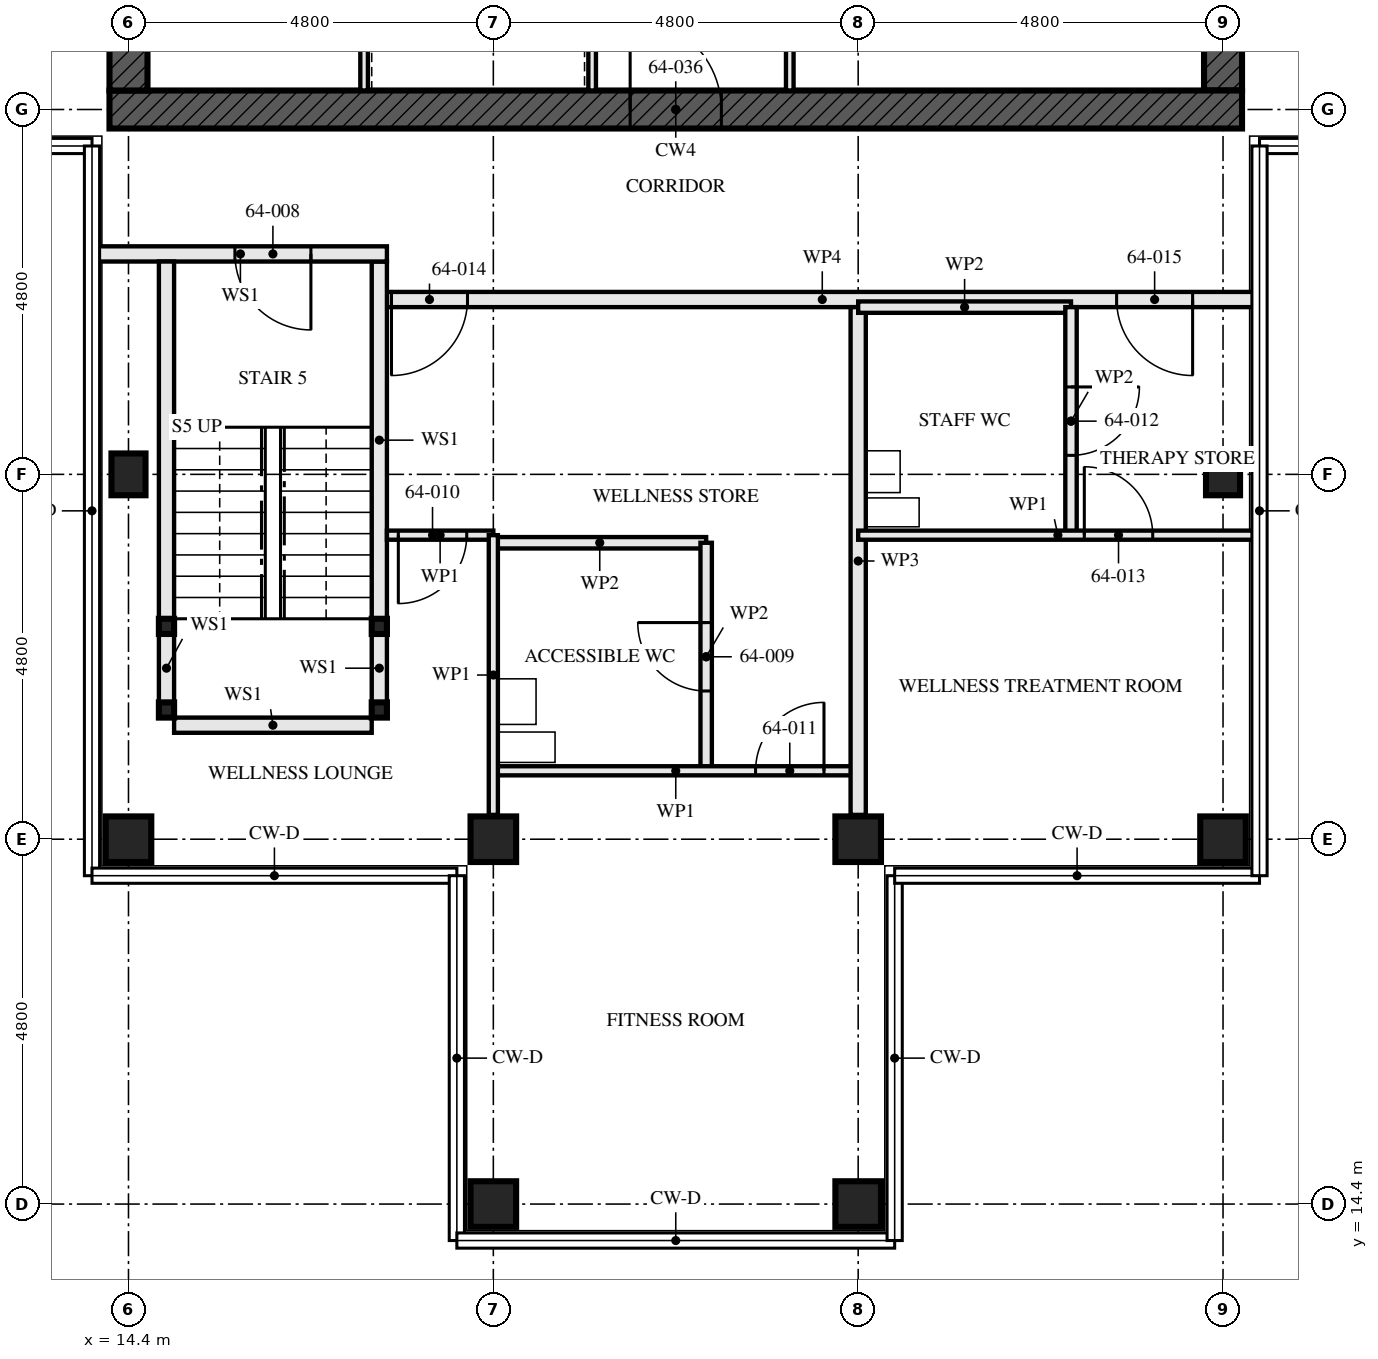
"""IFC4 building model, lengths in metres.
Left out: names, types, materials, properties, quantities, classifications, styles, units other than length and angle.
Written with IfcOpenShell. Run it as: python <this file> out.ifc"""

import sys

from ifc_helpers import new_model, si_unit, direction, frame, frame_2d, origin, origin_2d, place, context, subcontext, project, spatial, rectangle, hollow_rectangle, i_section, extrude, element, fill, save


model = new_model("IFC4")
c1 = context("Model", 3, precision=1e-05, world=origin(), true_north=direction((0.0, 1.0)))
c2 = subcontext(c1, "Body", "Model", "MODEL_VIEW")
j1 = project(units=[si_unit("LENGTHUNIT", "METRE"), si_unit("PLANEANGLEUNIT", "RADIAN")], contexts=[c1])
p1 = place(None, origin())
s1 = spatial("IfcSite", under=j1, at=p1, CompositionType="ELEMENT")
p2 = place(p1, origin())
s2 = spatial("IfcBuilding", under=s1, at=p2, CompositionType="ELEMENT")
p3 = place(p2, frame((0.0, 0.0, 233.0)))
s3 = spatial("IfcBuildingStorey", under=s2, at=p3, CompositionType="ELEMENT", Elevation=233.0)
p4 = place(p3, frame((14.4, 19.2, 0.0), z_axis=(0.0, 0.0, 1.0), x_axis=(0.0, 1.0, 0.0)))
e1 = element("IfcColumn", 1, at=p4, inside=s3, PredefinedType="COLUMN", context=c2, shape_type="SweptSolid", body=[
    extrude(hollow_rectangle(XDim=0.6, YDim=0.6, WallThickness=0.05, at=origin_2d()), origin(), (0.0, 0.0, 1.0), 3.5),
])
p5 = place(p3, frame((14.4, 24.0, 0.0), z_axis=(0.0, 0.0, 1.0), x_axis=(1.0, 0.0, 0.0)))
e2 = element("IfcColumn", 2, at=p5, inside=s3, PredefinedType="COLUMN", context=c2, shape_type="SweptSolid", body=[
    extrude(i_section(OverallWidth=0.448, OverallDepth=0.55, WebThickness=0.072, FlangeThickness=0.115, FilletRadius=0.015, at=origin_2d()), origin(), (0.0, 0.0, 1.0), 3.5),
])
for number, where, z_axis, x_axis in (
    (3, (19.2, 14.4, 0.0), (0.0, 0.0, 1.0), (0.0, 1.0, 0.0)),
    (4, (19.2, 19.2, 0.0), (0.0, 0.0, 1.0), (0.0, 1.0, 0.0)),
    (5, (24.0, 14.4, 0.0), (0.0, 0.0, 1.0), (0.0, 1.0, 0.0)),
    (6, (24.0, 19.2, 0.0), (0.0, 0.0, 1.0), (0.0, 1.0, 0.0)),
    (7, (28.8, 19.2, 0.0), (0.0, 0.0, 1.0), (0.0, 1.0, 0.0)),
):
    element("IfcColumn", number, at=place(p3, frame(where, z_axis=z_axis, x_axis=x_axis)), inside=s3, PredefinedType="COLUMN", context=c2, shape_type="SweptSolid", body=[
        extrude(hollow_rectangle(XDim=0.6, YDim=0.6, WallThickness=0.05, at=origin_2d()), origin(), (0.0, 0.0, 1.0), 3.5),
    ])
p6 = place(p3, frame((28.8, 24.0, 0.0), z_axis=(0.0, 0.0, 1.0), x_axis=(1.0, 0.0, 0.0)))
e8 = element("IfcColumn", 8, at=p6, inside=s3, PredefinedType="COLUMN", context=c2, shape_type="SweptSolid", body=[
    extrude(i_section(OverallWidth=0.448, OverallDepth=0.55, WebThickness=0.072, FlangeThickness=0.115, FilletRadius=0.015, at=origin_2d()), origin(), (0.0, 0.0, 1.0), 3.5),
])
p7 = place(p3, frame((14.15, 28.8, -0.17), z_axis=(0.0, 0.0, 1.0), x_axis=(1.0, 0.0, 0.0)))
e9 = element("IfcWall", 9, at=p7, inside=s3, PredefinedType="SHEAR", context=c2, shape_type="SweptSolid", body=[
    extrude(rectangle(XDim=14.9, YDim=0.5, at=frame_2d((7.45, 0.0))), origin(), (0.0, 0.0, 1.0), 3.5),
])
p8 = place(p7, frame((6.85, 0.0, 0.17)))
e10 = element("IfcOpeningElement", 10, at=p8, cuts=e9, PredefinedType="OPENING", context=c2, shape_type="SweptSolid", body=[
    extrude(rectangle(XDim=1.2, YDim=2.1, at=frame_2d((0.6, 1.05))), frame((0.0, 0.26, 0.0), z_axis=(0.0, -1.0, 0.0), x_axis=(1.0, 0.0, 0.0)), (0.0, 0.0, 1.0), 0.521),
])
p9 = place(p3, frame((14.4, 42.95, -0.17), z_axis=(0.0, 0.0, 1.0), x_axis=(0.0, -1.0, 0.0)))
e11 = element("IfcWall", 11, at=p9, inside=s3, PredefinedType="SHEAR", context=c2, shape_type="SweptSolid", body=[
    extrude(rectangle(XDim=13.9, YDim=0.5, at=frame_2d((6.95, 0.0))), origin(), (0.0, 0.0, 1.0), 3.5),
])
p10 = place(p9, frame((6.35, 0.0, 0.17)))
e12 = element("IfcOpeningElement", 12, at=p10, cuts=e11, PredefinedType="OPENING", context=c2, shape_type="SweptSolid", body=[
    extrude(rectangle(XDim=1.2, YDim=2.1, at=frame_2d((0.6, 1.05))), frame((0.0, 0.26, 0.0), z_axis=(0.0, -1.0, 0.0), x_axis=(1.0, 0.0, 0.0)), (0.0, 0.0, 1.0), 0.521),
])
p11 = place(p3, frame((28.8, 29.05, -0.17), z_axis=(0.0, 0.0, 1.0), x_axis=(0.0, 1.0, 0.0)))
e13 = element("IfcWall", 13, at=p11, inside=s3, PredefinedType="SHEAR", context=c2, shape_type="SweptSolid", body=[
    extrude(rectangle(XDim=13.9, YDim=0.5, at=frame_2d((6.95, 0.0))), origin(), (0.0, 0.0, 1.0), 3.5),
])
p12 = place(p11, frame((6.35, 0.0, 0.17)))
e14 = element("IfcOpeningElement", 14, at=p12, cuts=e13, PredefinedType="OPENING", context=c2, shape_type="SweptSolid", body=[
    extrude(rectangle(XDim=1.2, YDim=2.1, at=frame_2d((0.6, 1.05))), frame((0.0, 0.26, 0.0), z_axis=(0.0, -1.0, 0.0), x_axis=(1.0, 0.0, 0.0)), (0.0, 0.0, 1.0), 0.521),
])
for number, where, z_axis, x_axis in (
    (15, (14.9, 20.9, 0.0), (0.0, 0.0, 1.0), (1.0, 0.0, 0.0)),
    (16, (17.7, 20.9, 0.0), (0.0, 0.0, 1.0), (1.0, 0.0, 0.0)),
    (17, (14.9, 22.0, 0.0), (0.0, 0.0, 1.0), (1.0, 0.0, 0.0)),
    (18, (17.7, 22.0, 0.0), (0.0, 0.0, 1.0), (1.0, 0.0, 0.0)),
):
    element("IfcColumn", number, at=place(p3, frame(where, z_axis=z_axis, x_axis=x_axis)), inside=s3, PredefinedType="COLUMN", context=c2, shape_type="SweptSolid", body=[
        extrude(hollow_rectangle(XDim=0.2, YDim=0.2, WallThickness=0.008, at=origin_2d()), origin(), (0.0, 0.0, 1.0), 3.33),
    ])
p13 = place(p3, frame((14.9, 21.0, 0.0), z_axis=(0.0, 0.0, 1.0), x_axis=(0.0, 1.0, 0.0)))
e19 = element("IfcWall", 19, at=p13, inside=s3, PredefinedType="SOLIDWALL", context=c2, shape_type="SweptSolid", body=[
    extrude(rectangle(XDim=0.9, YDim=0.2, at=frame_2d((0.45, 0.0))), origin(), (0.0, 0.0, 1.0), 2.99),
])
p14 = place(p3, frame((14.9, 22.1, 0.0), z_axis=(0.0, 0.0, 1.0), x_axis=(0.0, 1.0, 0.0)))
e20 = element("IfcWall", 20, at=p14, inside=s3, PredefinedType="SOLIDWALL", context=c2, shape_type="SweptSolid", body=[
    extrude(rectangle(XDim=4.7, YDim=0.2, at=frame_2d((2.35, 0.0))), origin(), (0.0, 0.0, 1.0), 2.99),
])
p15 = place(p3, frame((17.7, 21.0, 0.0), z_axis=(0.0, 0.0, 1.0), x_axis=(0.0, 1.0, 0.0)))
e21 = element("IfcWall", 21, at=p15, inside=s3, PredefinedType="SOLIDWALL", context=c2, shape_type="SweptSolid", body=[
    extrude(rectangle(XDim=0.9, YDim=0.2, at=frame_2d((0.45, 0.0))), origin(), (0.0, 0.0, 1.0), 2.99),
])
p16 = place(p3, frame((17.7, 22.1, 0.0), z_axis=(0.0, 0.0, 1.0), x_axis=(0.0, 1.0, 0.0)))
e22 = element("IfcWall", 22, at=p16, inside=s3, PredefinedType="SOLIDWALL", context=c2, shape_type="SweptSolid", body=[
    extrude(rectangle(XDim=4.7, YDim=0.2, at=frame_2d((2.35, 0.0))), origin(), (0.0, 0.0, 1.0), 2.99),
])
p17 = place(p3, frame((15.0, 20.7, 0.0), z_axis=(0.0, 0.0, 1.0), x_axis=(1.0, 0.0, 0.0)))
e23 = element("IfcWall", 23, at=p17, inside=s3, PredefinedType="SOLIDWALL", context=c2, shape_type="SweptSolid", body=[
    extrude(rectangle(XDim=2.6, YDim=0.2, at=frame_2d((1.3, 0.0))), origin(), (0.0, 0.0, 1.0), 3.33),
])
p18 = place(p3, frame((13.945, 26.9, 0.0), z_axis=(0.0, 0.0, 1.0), x_axis=(1.0, 0.0, 0.0)))
e24 = element("IfcWall", 24, at=p18, inside=s3, PredefinedType="SOLIDWALL", context=c2, shape_type="SweptSolid", body=[
    extrude(rectangle(XDim=3.855, YDim=0.2, at=frame_2d((1.927, 0.0))), origin(), (0.0, 0.0, 1.0), 2.32),
])
p19 = place(p18, frame((1.855, 0.0, 0.0)))
e25 = element("IfcOpeningElement", 25, at=p19, cuts=e24, PredefinedType="OPENING", context=c2, shape_type="SweptSolid", body=[
    extrude(rectangle(XDim=1.0, YDim=2.1, at=frame_2d((0.5, 1.05))), frame((0.0, 0.111, 0.0), z_axis=(0.0, -1.0, 0.0), x_axis=(1.0, 0.0, 0.0)), (0.0, 0.0, 1.0), 0.221),
])
p20 = place(p3, frame((22.0, 20.1, 0.0), z_axis=(0.0, 0.0, 1.0), x_axis=(0.0, 1.0, 0.0)))
e26 = element("IfcWall", 26, at=p20, inside=s3, PredefinedType="PARTITIONING", context=c2, shape_type="SweptSolid", body=[
    extrude(rectangle(XDim=3.0, YDim=0.15, at=frame_2d((1.5, 0.0))), origin(), (0.0, 0.0, 1.0), 3.33),
])
p21 = place(p20, frame((1.05, 0.0, 0.0)))
e27 = element("IfcOpeningElement", 27, at=p21, cuts=e26, PredefinedType="OPENING", context=c2, shape_type="SweptSolid", body=[
    extrude(rectangle(XDim=0.9, YDim=2.1, at=frame_2d((0.45, 1.05))), frame((0.0, 0.085, 0.0), z_axis=(0.0, -1.0, 0.0), x_axis=(1.0, 0.0, 0.0)), (0.0, 0.0, 1.0), 0.171),
])
p22 = place(p3, frame((19.2, 23.1, 0.0), z_axis=(0.0, 0.0, 1.0), x_axis=(1.0, 0.0, 0.0)))
e28 = element("IfcWall", 28, at=p22, inside=s3, PredefinedType="PARTITIONING", context=c2, shape_type="SweptSolid", body=[
    extrude(rectangle(XDim=2.8, YDim=0.15, at=frame_2d((1.4, 0.0))), origin(), (0.0, 0.0, 1.0), 3.33),
])
p23 = place(p3, frame((17.8, 23.2, 0.0), z_axis=(0.0, 0.0, 1.0), x_axis=(1.0, 0.0, 0.0)))
e29 = element("IfcWall", 29, at=p23, inside=s3, PredefinedType="PARTITIONING", context=c2, shape_type="SweptSolid", body=[
    extrude(rectangle(XDim=1.4, YDim=0.12, at=frame_2d((0.7, 0.0))), origin(), (0.0, 0.0, 1.0), 3.33),
])
p24 = place(p23, frame((0.15, 0.0, 0.0)))
e30 = element("IfcOpeningElement", 30, at=p24, cuts=e29, PredefinedType="OPENING", context=c2, shape_type="SweptSolid", body=[
    extrude(rectangle(XDim=0.9, YDim=2.1, at=frame_2d((0.45, 1.05))), frame((0.0, 0.071, 0.0), z_axis=(0.0, -1.0, 0.0), x_axis=(1.0, 0.0, 0.0)), (0.0, 0.0, 1.0), 0.141),
])
p25 = place(p3, frame((19.2, 20.1, 0.0), z_axis=(0.0, 0.0, 1.0), x_axis=(1.0, 0.0, 0.0)))
e31 = element("IfcWall", 31, at=p25, inside=s3, PredefinedType="PARTITIONING", context=c2, shape_type="SweptSolid", body=[
    extrude(rectangle(XDim=4.8, YDim=0.12, at=frame_2d((2.4, 0.0))), origin(), (0.0, 0.0, 1.0), 3.33),
])
p26 = place(p25, frame((3.45, 0.0, 0.0)))
e32 = element("IfcOpeningElement", 32, at=p26, cuts=e31, PredefinedType="OPENING", context=c2, shape_type="SweptSolid", body=[
    extrude(rectangle(XDim=0.9, YDim=2.1, at=frame_2d((0.45, 1.05))), frame((0.0, 0.071, 0.0), z_axis=(0.0, -1.0, 0.0), x_axis=(1.0, 0.0, 0.0)), (0.0, 0.0, 1.0), 0.141),
])
p27 = place(p3, frame((19.2, 19.52, 0.0), z_axis=(0.0, 0.0, 1.0), x_axis=(0.0, 1.0, 0.0)))
e33 = element("IfcWall", 33, at=p27, inside=s3, PredefinedType="PARTITIONING", context=c2, shape_type="SweptSolid", body=[
    extrude(rectangle(XDim=3.68, YDim=0.12, at=frame_2d((1.84, 0.0))), origin(), (0.0, 0.0, 1.0), 2.55),
])
p28 = place(p3, frame((24.0, 19.52, 0.0), z_axis=(0.0, 0.0, 1.0), x_axis=(0.0, 1.0, 0.0)))
e34 = element("IfcWall", 34, at=p28, inside=s3, PredefinedType="PARTITIONING", context=c2, shape_type="SweptSolid", body=[
    extrude(rectangle(XDim=6.68, YDim=0.2, at=frame_2d((3.34, 0.0))), origin(), (0.0, 0.0, 1.0), 2.55),
])
p29 = place(p3, frame((26.8, 23.2, 0.0), z_axis=(0.0, 0.0, 1.0), x_axis=(0.0, 1.0, 0.0)))
e35 = element("IfcWall", 35, at=p29, inside=s3, PredefinedType="PARTITIONING", context=c2, shape_type="SweptSolid", body=[
    extrude(rectangle(XDim=3.0, YDim=0.15, at=frame_2d((1.5, 0.0))), origin(), (0.0, 0.0, 1.0), 2.55),
])
p30 = place(p29, frame((1.05, 0.0, 0.0)))
e36 = element("IfcOpeningElement", 36, at=p30, cuts=e35, PredefinedType="OPENING", context=c2, shape_type="SweptSolid", body=[
    extrude(rectangle(XDim=0.9, YDim=2.1, at=frame_2d((0.45, 1.05))), frame((0.0, 0.085, 0.0), z_axis=(0.0, -1.0, 0.0), x_axis=(1.0, 0.0, 0.0)), (0.0, 0.0, 1.0), 0.171),
])
p31 = place(p3, frame((24.0, 26.2, 0.0), z_axis=(0.0, 0.0, 1.0), x_axis=(1.0, 0.0, 0.0)))
e37 = element("IfcWall", 37, at=p31, inside=s3, PredefinedType="PARTITIONING", context=c2, shape_type="SweptSolid", body=[
    extrude(rectangle(XDim=2.8, YDim=0.15, at=frame_2d((1.4, 0.0))), origin(), (0.0, 0.0, 1.0), 3.33),
])
p32 = place(p3, frame((24.0, 23.2, 0.0), z_axis=(0.0, 0.0, 1.0), x_axis=(1.0, 0.0, 0.0)))
e38 = element("IfcWall", 38, at=p32, inside=s3, PredefinedType="PARTITIONING", context=c2, shape_type="SweptSolid", body=[
    extrude(rectangle(XDim=5.255, YDim=0.12, at=frame_2d((2.627, 0.0))), origin(), (0.0, 0.0, 1.0), 2.32),
])
p33 = place(p32, frame((2.975, 0.0, 0.0)))
e39 = element("IfcOpeningElement", 39, at=p33, cuts=e38, PredefinedType="OPENING", context=c2, shape_type="SweptSolid", body=[
    extrude(rectangle(XDim=0.9, YDim=2.1, at=frame_2d((0.45, 1.05))), frame((0.0, 0.071, 0.0), z_axis=(0.0, -1.0, 0.0), x_axis=(1.0, 0.0, 0.0)), (0.0, 0.0, 1.0), 0.141),
])
p34 = place(p3, frame((17.8, 26.3, 0.0), z_axis=(0.0, 0.0, 1.0), x_axis=(1.0, 0.0, 0.0)))
e40 = element("IfcWall", 40, at=p34, inside=s3, PredefinedType="PARTITIONING", context=c2, shape_type="SweptSolid", body=[
    extrude(rectangle(XDim=11.455, YDim=0.2, at=frame_2d((5.728, 0.0))), origin(), (0.0, 0.0, 1.0), 2.32),
])
p35 = place(p34, frame((0.06, 0.0, 0.0)))
e41 = element("IfcOpeningElement", 41, at=p35, cuts=e40, PredefinedType="OPENING", context=c2, shape_type="SweptSolid", body=[
    extrude(rectangle(XDim=1.0, YDim=2.1, at=frame_2d((0.5, 1.05))), frame((0.0, 0.111, 0.0), z_axis=(0.0, -1.0, 0.0), x_axis=(1.0, 0.0, 0.0)), (0.0, 0.0, 1.0), 0.221),
])
p36 = place(p34, frame((9.6, 0.0, 0.0)))
e42 = element("IfcOpeningElement", 42, at=p36, cuts=e40, PredefinedType="OPENING", context=c2, shape_type="SweptSolid", body=[
    extrude(rectangle(XDim=1.0, YDim=2.1, at=frame_2d((0.5, 1.05))), frame((0.0, 0.111, 0.0), z_axis=(0.0, -1.0, 0.0), x_axis=(1.0, 0.0, 0.0)), (0.0, 0.0, 1.0), 0.221),
])
p37 = place(p3, frame((20.5, 29.05, 0.0), z_axis=(0.0, 0.0, 1.0), x_axis=(0.0, 1.0, 0.0)))
e43 = element("IfcWall", 43, at=p37, inside=s3, PredefinedType="SOLIDWALL", context=c2, shape_type="SweptSolid", body=[
    extrude(rectangle(XDim=5.8, YDim=0.1, at=frame_2d((2.9, 0.0))), origin(), (0.0, 0.0, 1.0), 3.33),
])
p38 = place(p37, frame((0.8, 0.0, 0.0)))
e44 = element("IfcOpeningElement", 44, at=p38, cuts=e43, PredefinedType="OPENING", context=c2, shape_type="SweptSolid", body=[
    extrude(rectangle(XDim=1.1, YDim=2.3, at=frame_2d((0.55, 1.15))), frame((0.0, 0.061, 0.0), z_axis=(0.0, -1.0, 0.0), x_axis=(1.0, 0.0, 0.0)), (0.0, 0.0, 1.0), 0.121),
])
p39 = place(p37, frame((3.775, 0.0, 0.0)))
e45 = element("IfcOpeningElement", 45, at=p39, cuts=e43, PredefinedType="OPENING", context=c2, shape_type="SweptSolid", body=[
    extrude(rectangle(XDim=1.1, YDim=2.3, at=frame_2d((0.55, 1.15))), frame((0.0, 0.061, 0.0), z_axis=(0.0, -1.0, 0.0), x_axis=(1.0, 0.0, 0.0)), (0.0, 0.0, 1.0), 0.121),
])
p40 = place(p3, frame((23.1, 29.05, 0.0), z_axis=(0.0, 0.0, 1.0), x_axis=(0.0, 1.0, 0.0)))
e46 = element("IfcWall", 46, at=p40, inside=s3, PredefinedType="SOLIDWALL", context=c2, shape_type="SweptSolid", body=[
    extrude(rectangle(XDim=5.8, YDim=0.1, at=frame_2d((2.9, 0.0))), origin(), (0.0, 0.0, 1.0), 3.33),
])
p41 = place(p40, frame((1.0, 0.0, 0.0)))
e47 = element("IfcOpeningElement", 47, at=p41, cuts=e46, PredefinedType="OPENING", context=c2, shape_type="SweptSolid", body=[
    extrude(rectangle(XDim=0.7, YDim=2.1, at=frame_2d((0.35, 1.05))), frame((0.0, 0.061, 0.0), z_axis=(0.0, -1.0, 0.0), x_axis=(1.0, 0.0, 0.0)), (0.0, 0.0, 1.0), 0.121),
])
p42 = place(p3, frame((17.5, 29.05, 0.0), z_axis=(0.0, 0.0, 1.0), x_axis=(0.0, 1.0, 0.0)))
e48 = element("IfcWall", 48, at=p42, inside=s3, PredefinedType="SOLIDWALL", context=c2, shape_type="SweptSolid", body=[
    extrude(rectangle(XDim=5.8, YDim=0.1, at=frame_2d((2.9, 0.0))), origin(), (0.0, 0.0, 1.0), 3.33),
])
p43 = place(p19, frame((1.0, 0.0, 0.0), z_axis=(0.0, 0.0, 1.0), x_axis=(-1.0, 0.0, 0.0)))
e49 = element("IfcDoor", 49, at=p43, inside=s3, OperationType="SINGLE_SWING_RIGHT", PredefinedType="DOOR", context=c2, shape_type="SweptSolid", body=[
    extrude(rectangle(XDim=1.0, YDim=2.1, at=frame_2d((0.5, 1.05))), frame((0.0, 0.032, 0.0), z_axis=(0.0, -1.0, 0.0), x_axis=(1.0, 0.0, 0.0)), (0.0, 0.0, 1.0), 0.064),
])
fill(e25, e49)
p44 = place(p21, origin())
e50 = element("IfcDoor", 50, at=p44, inside=s3, OperationType="SINGLE_SWING_LEFT", PredefinedType="DOOR", context=c2, shape_type="SweptSolid", body=[
    extrude(rectangle(XDim=0.9, YDim=2.1, at=frame_2d((0.45, 1.05))), frame((0.0, 0.022, 0.0), z_axis=(0.0, -1.0, 0.0), x_axis=(1.0, 0.0, 0.0)), (0.0, 0.0, 1.0), 0.044),
])
fill(e27, e50)
p45 = place(p24, frame((0.9, 0.0, 0.0), z_axis=(0.0, 0.0, 1.0), x_axis=(-1.0, 0.0, 0.0)))
e51 = element("IfcDoor", 51, at=p45, inside=s3, OperationType="SINGLE_SWING_LEFT", PredefinedType="DOOR", context=c2, shape_type="SweptSolid", body=[
    extrude(rectangle(XDim=0.9, YDim=2.1, at=frame_2d((0.45, 1.05))), frame((0.0, 0.022, 0.0), z_axis=(0.0, -1.0, 0.0), x_axis=(1.0, 0.0, 0.0)), (0.0, 0.0, 1.0), 0.044),
])
fill(e30, e51)
p46 = place(p26, origin())
e52 = element("IfcDoor", 52, at=p46, inside=s3, OperationType="SINGLE_SWING_LEFT", PredefinedType="DOOR", context=c2, shape_type="SweptSolid", body=[
    extrude(rectangle(XDim=0.9, YDim=2.1, at=frame_2d((0.45, 1.05))), frame((0.0, 0.022, 0.0), z_axis=(0.0, -1.0, 0.0), x_axis=(1.0, 0.0, 0.0)), (0.0, 0.0, 1.0), 0.044),
])
fill(e32, e52)
p47 = place(p30, frame((0.9, 0.0, 0.0), z_axis=(0.0, 0.0, 1.0), x_axis=(-1.0, 0.0, 0.0)))
e53 = element("IfcDoor", 53, at=p47, inside=s3, OperationType="SINGLE_SWING_RIGHT", PredefinedType="DOOR", context=c2, shape_type="SweptSolid", body=[
    extrude(rectangle(XDim=0.9, YDim=2.1, at=frame_2d((0.45, 1.05))), frame((0.0, 0.022, 0.0), z_axis=(0.0, -1.0, 0.0), x_axis=(1.0, 0.0, 0.0)), (0.0, 0.0, 1.0), 0.044),
])
fill(e36, e53)
p48 = place(p33, origin())
e54 = element("IfcDoor", 54, at=p48, inside=s3, OperationType="SINGLE_SWING_RIGHT", PredefinedType="DOOR", context=c2, shape_type="SweptSolid", body=[
    extrude(rectangle(XDim=0.9, YDim=2.1, at=frame_2d((0.45, 1.05))), frame((0.0, 0.022, 0.0), z_axis=(0.0, -1.0, 0.0), x_axis=(1.0, 0.0, 0.0)), (0.0, 0.0, 1.0), 0.044),
])
fill(e39, e54)
p49 = place(p35, frame((1.0, 0.0, 0.0), z_axis=(0.0, 0.0, 1.0), x_axis=(-1.0, 0.0, 0.0)))
e55 = element("IfcDoor", 55, at=p49, inside=s3, OperationType="SINGLE_SWING_LEFT", PredefinedType="DOOR", context=c2, shape_type="SweptSolid", body=[
    extrude(rectangle(XDim=1.0, YDim=2.1, at=frame_2d((0.5, 1.05))), frame((0.0, 0.027, 0.0), z_axis=(0.0, -1.0, 0.0), x_axis=(1.0, 0.0, 0.0)), (0.0, 0.0, 1.0), 0.054),
])
fill(e41, e55)
p50 = place(p36, frame((1.0, 0.0, 0.0), z_axis=(0.0, 0.0, 1.0), x_axis=(-1.0, 0.0, 0.0)))
e56 = element("IfcDoor", 56, at=p50, inside=s3, OperationType="SINGLE_SWING_RIGHT", PredefinedType="DOOR", context=c2, shape_type="SweptSolid", body=[
    extrude(rectangle(XDim=1.0, YDim=2.1, at=frame_2d((0.5, 1.05))), frame((0.0, 0.027, 0.0), z_axis=(0.0, -1.0, 0.0), x_axis=(1.0, 0.0, 0.0)), (0.0, 0.0, 1.0), 0.054),
])
fill(e42, e56)
p51 = place(p8, origin())
e57 = element("IfcDoor", 57, at=p51, inside=s3, OperationType="SINGLE_SWING_LEFT", PredefinedType="DOOR", context=c2, shape_type="SweptSolid", body=[
    extrude(rectangle(XDim=1.2, YDim=2.1, at=frame_2d((0.6, 1.05))), frame((0.0, 0.027, 0.0), z_axis=(0.0, -1.0, 0.0), x_axis=(1.0, 0.0, 0.0)), (0.0, 0.0, 1.0), 0.054),
])
fill(e10, e57)
save(model, sys.argv[1])
